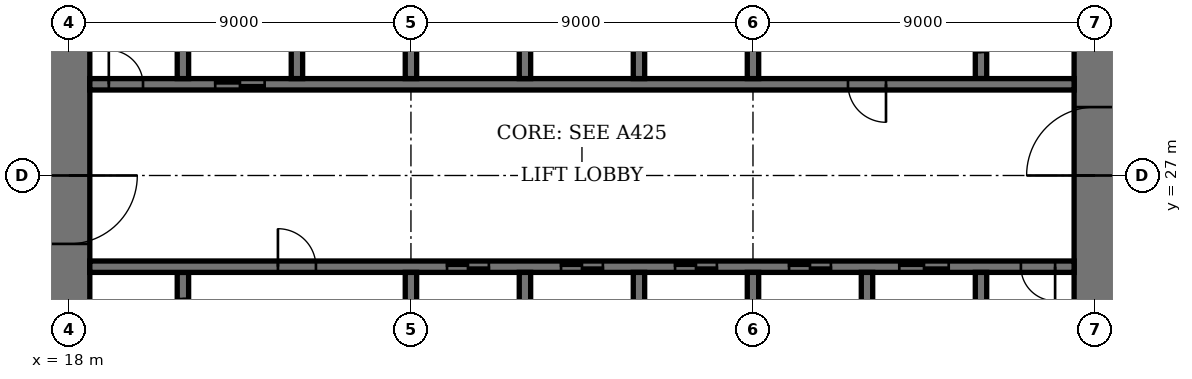
"""IFC4 building model, lengths in metres.
Left out: names, types, materials, properties, quantities, classifications, styles, units other than length and angle.
Written with IfcOpenShell. Run it as: python <this file> out.ifc"""

import sys

from ifc_helpers import new_model, si_unit, direction, frame, frame_2d, origin, place, context, subcontext, project, spatial, rectangle, extrude, element, fill, save


model = new_model("IFC4")
c1 = context("Model", 3, precision=1e-05, world=origin(), true_north=direction((0.0, 1.0)))
c2 = subcontext(c1, "Body", "Model", "MODEL_VIEW")
j1 = project(units=[si_unit("LENGTHUNIT", "METRE"), si_unit("PLANEANGLEUNIT", "RADIAN")], contexts=[c1])
p1 = place(None, origin())
s1 = spatial("IfcSite", under=j1, at=p1, CompositionType="ELEMENT")
p2 = place(p1, origin())
s2 = spatial("IfcBuilding", under=s1, at=p2, CompositionType="ELEMENT")
p3 = place(p2, frame((0.0, 0.0, 39.8)))
s3 = spatial("IfcBuildingStorey", under=s2, at=p3, CompositionType="ELEMENT", Elevation=39.8)
p4 = place(p3, frame((18.0, 35.45, 0.0), z_axis=(0.0, 0.0, 1.0), x_axis=(0.0, -1.0, 0.0)))
e1 = element("IfcWall", 1, at=p4, inside=s3, PredefinedType="SHEAR", context=c2, shape_type="SweptSolid", body=[
    extrude(rectangle(XDim=16.9, YDim=1.1, at=frame_2d((8.45, 0.0))), origin(), (0.0, 0.0, 1.0), 4.0),
])
p5 = place(p4, frame((8.45, 0.0, 0.0)))
e2 = element("IfcOpeningElement", 2, at=p5, cuts=e1, PredefinedType="OPENING", context=c2, shape_type="SweptSolid", body=[
    extrude(rectangle(XDim=1.8, YDim=2.4, at=frame_2d((0.9, 1.2))), frame((0.0, 0.56, 0.0), z_axis=(0.0, -1.0, 0.0), x_axis=(1.0, 0.0, 0.0)), (0.0, 0.0, 1.0), 1.12),
])
p6 = place(p3, frame((45.0, 18.55, 0.0), z_axis=(0.0, 0.0, 1.0), x_axis=(0.0, 1.0, 0.0)))
e3 = element("IfcWall", 3, at=p6, inside=s3, PredefinedType="SHEAR", context=c2, shape_type="SweptSolid", body=[
    extrude(rectangle(XDim=16.9, YDim=1.1, at=frame_2d((8.45, 0.0))), origin(), (0.0, 0.0, 1.0), 4.0),
])
p7 = place(p6, frame((8.45, 0.0, 0.0)))
e4 = element("IfcOpeningElement", 4, at=p7, cuts=e3, PredefinedType="OPENING", context=c2, shape_type="SweptSolid", body=[
    extrude(rectangle(XDim=1.8, YDim=2.4, at=frame_2d((0.9, 1.2))), frame((0.0, 0.56, 0.0), z_axis=(0.0, -1.0, 0.0), x_axis=(1.0, 0.0, 0.0)), (0.0, 0.0, 1.0), 1.12),
])
p8 = place(p3, frame((21.0, 21.95, 0.0), z_axis=(0.0, 0.0, 1.0), x_axis=(0.0, 1.0, 0.0)))
e5 = element("IfcWall", 5, at=p8, inside=s3, PredefinedType="SHEAR", context=c2, shape_type="SweptSolid", body=[
    extrude(rectangle(XDim=2.5, YDim=0.3, at=frame_2d((1.25, 0.0))), origin(), (0.0, 0.0, 1.0), 4.0),
])
p9 = place(p8, frame((0.7, 0.0, 0.0)))
e6 = element("IfcOpeningElement", 6, at=p9, cuts=e5, PredefinedType="OPENING", context=c2, shape_type="SweptSolid", body=[
    extrude(rectangle(XDim=1.1, YDim=2.4, at=frame_2d((0.55, 1.2))), frame((0.0, 0.16, 0.0), z_axis=(0.0, -1.0, 0.0), x_axis=(1.0, 0.0, 0.0)), (0.0, 0.0, 1.0), 0.32),
])
p10 = place(p3, frame((42.0, 29.55, 0.0), z_axis=(0.0, 0.0, 1.0), x_axis=(0.0, 1.0, 0.0)))
e7 = element("IfcWall", 7, at=p10, inside=s3, PredefinedType="SHEAR", context=c2, shape_type="SweptSolid", body=[
    extrude(rectangle(XDim=2.5, YDim=0.3, at=frame_2d((1.25, 0.0))), origin(), (0.0, 0.0, 1.0), 4.0),
])
p11 = place(p10, frame((0.7, 0.0, 0.0)))
e8 = element("IfcOpeningElement", 8, at=p11, cuts=e7, PredefinedType="OPENING", context=c2, shape_type="SweptSolid", body=[
    extrude(rectangle(XDim=1.1, YDim=2.4, at=frame_2d((0.55, 1.2))), frame((0.0, 0.16, 0.0), z_axis=(0.0, -1.0, 0.0), x_axis=(1.0, 0.0, 0.0)), (0.0, 0.0, 1.0), 0.32),
])
p12 = place(p3, frame((18.55, 24.6, 0.0), z_axis=(0.0, 0.0, 1.0), x_axis=(1.0, 0.0, 0.0)))
e9 = element("IfcWall", 9, at=p12, inside=s3, PredefinedType="SHEAR", context=c2, shape_type="SweptSolid", body=[
    extrude(rectangle(XDim=25.9, YDim=0.3, at=frame_2d((12.95, 0.0))), origin(), (0.0, 0.0, 1.0), 4.0),
])
p13 = place(p12, frame((4.95, 0.0, 0.0)))
e10 = element("IfcOpeningElement", 10, at=p13, cuts=e9, PredefinedType="OPENING", context=c2, shape_type="SweptSolid", body=[
    extrude(rectangle(XDim=1.0, YDim=2.4, at=frame_2d((0.5, 1.2))), frame((0.0, 0.16, 0.0), z_axis=(0.0, -1.0, 0.0), x_axis=(1.0, 0.0, 0.0)), (0.0, 0.0, 1.0), 0.32),
])
p14 = place(p12, frame((24.5, 0.0, 0.0)))
e11 = element("IfcOpeningElement", 11, at=p14, cuts=e9, PredefinedType="OPENING", context=c2, shape_type="SweptSolid", body=[
    extrude(rectangle(XDim=0.9, YDim=2.1, at=frame_2d((0.45, 1.05))), frame((0.0, 0.16, 0.0), z_axis=(0.0, -1.0, 0.0), x_axis=(1.0, 0.0, 0.0)), (0.0, 0.0, 1.0), 0.32),
])
p15 = place(p12, frame((9.4, 0.0, 0.0)))
e12 = element("IfcOpeningElement", 12, at=p15, cuts=e9, PredefinedType="OPENING", context=c2, shape_type="SweptSolid", body=[
    extrude(rectangle(XDim=1.1, YDim=2.4, at=frame_2d((0.55, 1.2))), frame((0.0, 0.16, 0.0), z_axis=(0.0, -1.0, 0.0), x_axis=(1.0, 0.0, 0.0)), (0.0, 0.0, 1.0), 0.32),
])
p16 = place(p12, frame((12.4, 0.0, 0.0)))
e13 = element("IfcOpeningElement", 13, at=p16, cuts=e9, PredefinedType="OPENING", context=c2, shape_type="SweptSolid", body=[
    extrude(rectangle(XDim=1.1, YDim=2.4, at=frame_2d((0.55, 1.2))), frame((0.0, 0.16, 0.0), z_axis=(0.0, -1.0, 0.0), x_axis=(1.0, 0.0, 0.0)), (0.0, 0.0, 1.0), 0.32),
])
p17 = place(p12, frame((15.4, 0.0, 0.0)))
e14 = element("IfcOpeningElement", 14, at=p17, cuts=e9, PredefinedType="OPENING", context=c2, shape_type="SweptSolid", body=[
    extrude(rectangle(XDim=1.1, YDim=2.4, at=frame_2d((0.55, 1.2))), frame((0.0, 0.16, 0.0), z_axis=(0.0, -1.0, 0.0), x_axis=(1.0, 0.0, 0.0)), (0.0, 0.0, 1.0), 0.32),
])
p18 = place(p12, frame((18.4, 0.0, 0.0)))
e15 = element("IfcOpeningElement", 15, at=p18, cuts=e9, PredefinedType="OPENING", context=c2, shape_type="SweptSolid", body=[
    extrude(rectangle(XDim=1.1, YDim=2.4, at=frame_2d((0.55, 1.2))), frame((0.0, 0.16, 0.0), z_axis=(0.0, -1.0, 0.0), x_axis=(1.0, 0.0, 0.0)), (0.0, 0.0, 1.0), 0.32),
])
p19 = place(p12, frame((21.3, 0.0, 0.0)))
e16 = element("IfcOpeningElement", 16, at=p19, cuts=e9, PredefinedType="OPENING", context=c2, shape_type="SweptSolid", body=[
    extrude(rectangle(XDim=1.3, YDim=2.4, at=frame_2d((0.65, 1.2))), frame((0.0, 0.16, 0.0), z_axis=(0.0, -1.0, 0.0), x_axis=(1.0, 0.0, 0.0)), (0.0, 0.0, 1.0), 0.32),
])
p20 = place(p3, frame((18.55, 29.4, 0.0), z_axis=(0.0, 0.0, 1.0), x_axis=(1.0, 0.0, 0.0)))
e17 = element("IfcWall", 17, at=p20, inside=s3, PredefinedType="SHEAR", context=c2, shape_type="SweptSolid", body=[
    extrude(rectangle(XDim=25.9, YDim=0.3, at=frame_2d((12.95, 0.0))), origin(), (0.0, 0.0, 1.0), 4.0),
])
p21 = place(p20, frame((19.95, 0.0, 0.0)))
e18 = element("IfcOpeningElement", 18, at=p21, cuts=e17, PredefinedType="OPENING", context=c2, shape_type="SweptSolid", body=[
    extrude(rectangle(XDim=1.0, YDim=2.4, at=frame_2d((0.5, 1.2))), frame((0.0, 0.16, 0.0), z_axis=(0.0, -1.0, 0.0), x_axis=(1.0, 0.0, 0.0)), (0.0, 0.0, 1.0), 0.32),
])
p22 = place(p20, frame((0.5, 0.0, 0.0)))
e19 = element("IfcOpeningElement", 19, at=p22, cuts=e17, PredefinedType="OPENING", context=c2, shape_type="SweptSolid", body=[
    extrude(rectangle(XDim=0.9, YDim=2.1, at=frame_2d((0.45, 1.05))), frame((0.0, 0.16, 0.0), z_axis=(0.0, -1.0, 0.0), x_axis=(1.0, 0.0, 0.0)), (0.0, 0.0, 1.0), 0.32),
])
p23 = place(p20, frame((3.3, 0.0, 0.0)))
e20 = element("IfcOpeningElement", 20, at=p23, cuts=e17, PredefinedType="OPENING", context=c2, shape_type="SweptSolid", body=[
    extrude(rectangle(XDim=1.3, YDim=2.4, at=frame_2d((0.65, 1.2))), frame((0.0, 0.16, 0.0), z_axis=(0.0, -1.0, 0.0), x_axis=(1.0, 0.0, 0.0)), (0.0, 0.0, 1.0), 0.32),
])
for number, where, z_axis, x_axis in (
    (21, (30.0, 21.75, 0.0), (0.0, 0.0, 1.0), (0.0, 1.0, 0.0)),
    (22, (33.0, 29.55, 0.0), (0.0, 0.0, 1.0), (0.0, 1.0, 0.0)),
    (23, (33.0, 21.75, 0.0), (0.0, 0.0, 1.0), (0.0, 1.0, 0.0)),
    (24, (30.0, 29.55, 0.0), (0.0, 0.0, 1.0), (0.0, 1.0, 0.0)),
    (25, (36.0, 21.75, 0.0), (0.0, 0.0, 1.0), (0.0, 1.0, 0.0)),
    (26, (27.0, 29.55, 0.0), (0.0, 0.0, 1.0), (0.0, 1.0, 0.0)),
):
    element("IfcWall", number, at=place(p3, frame(where, z_axis=z_axis, x_axis=x_axis)), inside=s3, PredefinedType="SHEAR", context=c2, shape_type="SweptSolid", body=[
        extrude(rectangle(XDim=2.7, YDim=0.3, at=frame_2d((1.35, 0.0))), origin(), (0.0, 0.0, 1.0), 4.0),
    ])
for number, where, z_axis, x_axis in (
    (27, (39.0, 18.55, 0.0), (0.0, 0.0, 1.0), (0.0, 1.0, 0.0)),
    (28, (24.0, 29.55, 0.0), (0.0, 0.0, 1.0), (0.0, 1.0, 0.0)),
):
    element("IfcWall", number, at=place(p3, frame(where, z_axis=z_axis, x_axis=x_axis)), inside=s3, PredefinedType="SHEAR", context=c2, shape_type="SweptSolid", body=[
        extrude(rectangle(XDim=5.9, YDim=0.3, at=frame_2d((2.95, 0.0))), origin(), (0.0, 0.0, 1.0), 4.0),
    ])
for number, where, z_axis, x_axis in (
    (29, (42.0, 21.75, 0.0), (0.0, 0.0, 1.0), (0.0, 1.0, 0.0)),
    (30, (21.0, 29.55, 0.0), (0.0, 0.0, 1.0), (0.0, 1.0, 0.0)),
):
    element("IfcWall", number, at=place(p3, frame(where, z_axis=z_axis, x_axis=x_axis)), inside=s3, PredefinedType="SHEAR", context=c2, shape_type="SweptSolid", body=[
        extrude(rectangle(XDim=2.7, YDim=0.3, at=frame_2d((1.35, 0.0))), origin(), (0.0, 0.0, 1.0), 4.0),
    ])
for number, where, z_axis, x_axis in (
    (31, (27.0, 21.6, 0.0), (0.0, 0.0, 1.0), (0.0, 1.0, 0.0)),
    (32, (36.0, 29.55, 0.0), (0.0, 0.0, 1.0), (0.0, 1.0, 0.0)),
):
    element("IfcWall", number, at=place(p3, frame(where, z_axis=z_axis, x_axis=x_axis)), inside=s3, PredefinedType="SHEAR", context=c2, shape_type="SweptSolid", body=[
        extrude(rectangle(XDim=2.85, YDim=0.3, at=frame_2d((1.425, 0.0))), origin(), (0.0, 0.0, 1.0), 4.0),
    ])
p24 = place(p5, origin())
e33 = element("IfcDoor", 33, at=p24, inside=s3, OperationType="DOUBLE_DOOR_DOUBLE_SWING", PredefinedType="DOOR", context=c2, shape_type="SweptSolid", body=[
    extrude(rectangle(XDim=1.8, YDim=2.4, at=frame_2d((0.9, 1.2))), frame((0.0, 0.03, 0.0), z_axis=(0.0, -1.0, 0.0), x_axis=(1.0, 0.0, 0.0)), (0.0, 0.0, 1.0), 0.06),
    extrude(rectangle(XDim=0.04, YDim=2.4, at=frame_2d((0.02, 1.2))), frame((0.0, 0.55, 0.0), z_axis=(0.0, -1.0, 0.0), x_axis=(1.0, 0.0, 0.0)), (0.0, 0.0, 1.0), 1.1),
    extrude(rectangle(XDim=0.04, YDim=2.4, at=frame_2d((1.78, 1.2))), frame((0.0, 0.55, 0.0), z_axis=(0.0, -1.0, 0.0), x_axis=(1.0, 0.0, 0.0)), (0.0, 0.0, 1.0), 1.1),
    extrude(rectangle(XDim=1.8, YDim=0.04, at=frame_2d((0.9, 2.38))), frame((0.0, 0.55, 0.0), z_axis=(0.0, -1.0, 0.0), x_axis=(1.0, 0.0, 0.0)), (0.0, 0.0, 1.0), 1.1),
])
fill(e2, e33)
p25 = place(p7, origin())
e34 = element("IfcDoor", 34, at=p25, inside=s3, OperationType="DOUBLE_DOOR_DOUBLE_SWING", PredefinedType="DOOR", context=c2, shape_type="SweptSolid", body=[
    extrude(rectangle(XDim=1.8, YDim=2.4, at=frame_2d((0.9, 1.2))), frame((0.0, 0.03, 0.0), z_axis=(0.0, -1.0, 0.0), x_axis=(1.0, 0.0, 0.0)), (0.0, 0.0, 1.0), 0.06),
    extrude(rectangle(XDim=0.04, YDim=2.4, at=frame_2d((0.02, 1.2))), frame((0.0, 0.55, 0.0), z_axis=(0.0, -1.0, 0.0), x_axis=(1.0, 0.0, 0.0)), (0.0, 0.0, 1.0), 1.1),
    extrude(rectangle(XDim=0.04, YDim=2.4, at=frame_2d((1.78, 1.2))), frame((0.0, 0.55, 0.0), z_axis=(0.0, -1.0, 0.0), x_axis=(1.0, 0.0, 0.0)), (0.0, 0.0, 1.0), 1.1),
    extrude(rectangle(XDim=1.8, YDim=0.04, at=frame_2d((0.9, 2.38))), frame((0.0, 0.55, 0.0), z_axis=(0.0, -1.0, 0.0), x_axis=(1.0, 0.0, 0.0)), (0.0, 0.0, 1.0), 1.1),
])
fill(e4, e34)
p26 = place(p13, origin())
e35 = element("IfcDoor", 35, at=p26, inside=s3, OperationType="SINGLE_SWING_RIGHT", PredefinedType="DOOR", context=c2, shape_type="SweptSolid", body=[
    extrude(rectangle(XDim=1.0, YDim=2.4, at=frame_2d((0.5, 1.2))), frame((0.0, 0.03, 0.0), z_axis=(0.0, -1.0, 0.0), x_axis=(1.0, 0.0, 0.0)), (0.0, 0.0, 1.0), 0.06),
])
fill(e10, e35)
p27 = place(p21, origin())
e36 = element("IfcDoor", 36, at=p27, inside=s3, OperationType="SINGLE_SWING_RIGHT", PredefinedType="DOOR", context=c2, shape_type="SweptSolid", body=[
    extrude(rectangle(XDim=1.0, YDim=2.4, at=frame_2d((0.5, 1.2))), frame((0.0, 0.03, 0.0), z_axis=(0.0, -1.0, 0.0), x_axis=(1.0, 0.0, 0.0)), (0.0, 0.0, 1.0), 0.06),
])
fill(e18, e36)
p28 = place(p14, origin())
e37 = element("IfcDoor", 37, at=p28, inside=s3, OperationType="SINGLE_SWING_RIGHT", PredefinedType="DOOR", context=c2, shape_type="SweptSolid", body=[
    extrude(rectangle(XDim=0.9, YDim=2.1, at=frame_2d((0.45, 1.05))), frame((0.0, 0.03, 0.0), z_axis=(0.0, -1.0, 0.0), x_axis=(1.0, 0.0, 0.0)), (0.0, 0.0, 1.0), 0.06),
])
fill(e11, e37)
p29 = place(p22, origin())
e38 = element("IfcDoor", 38, at=p29, inside=s3, OperationType="SINGLE_SWING_RIGHT", PredefinedType="DOOR", context=c2, shape_type="SweptSolid", body=[
    extrude(rectangle(XDim=0.9, YDim=2.1, at=frame_2d((0.45, 1.05))), frame((0.0, 0.03, 0.0), z_axis=(0.0, -1.0, 0.0), x_axis=(1.0, 0.0, 0.0)), (0.0, 0.0, 1.0), 0.06),
])
fill(e19, e38)
p30 = place(p15, origin())
e39 = element("IfcDoor", 39, at=p30, inside=s3, OperationType="DOUBLE_DOOR_SLIDING", PredefinedType="DOOR", context=c2, shape_type="SweptSolid", body=[
    extrude(rectangle(XDim=1.1, YDim=2.4, at=frame_2d((0.55, 1.2))), frame((0.0, 0.02, 0.0), z_axis=(0.0, -1.0, 0.0), x_axis=(1.0, 0.0, 0.0)), (0.0, 0.0, 1.0), 0.04),
])
fill(e12, e39)
p31 = place(p16, origin())
e40 = element("IfcDoor", 40, at=p31, inside=s3, OperationType="DOUBLE_DOOR_SLIDING", PredefinedType="DOOR", context=c2, shape_type="SweptSolid", body=[
    extrude(rectangle(XDim=1.1, YDim=2.4, at=frame_2d((0.55, 1.2))), frame((0.0, 0.02, 0.0), z_axis=(0.0, -1.0, 0.0), x_axis=(1.0, 0.0, 0.0)), (0.0, 0.0, 1.0), 0.04),
])
fill(e13, e40)
p32 = place(p17, origin())
e41 = element("IfcDoor", 41, at=p32, inside=s3, OperationType="DOUBLE_DOOR_SLIDING", PredefinedType="DOOR", context=c2, shape_type="SweptSolid", body=[
    extrude(rectangle(XDim=1.1, YDim=2.4, at=frame_2d((0.55, 1.2))), frame((0.0, 0.02, 0.0), z_axis=(0.0, -1.0, 0.0), x_axis=(1.0, 0.0, 0.0)), (0.0, 0.0, 1.0), 0.04),
])
fill(e14, e41)
p33 = place(p18, origin())
e42 = element("IfcDoor", 42, at=p33, inside=s3, OperationType="DOUBLE_DOOR_SLIDING", PredefinedType="DOOR", context=c2, shape_type="SweptSolid", body=[
    extrude(rectangle(XDim=1.1, YDim=2.4, at=frame_2d((0.55, 1.2))), frame((0.0, 0.02, 0.0), z_axis=(0.0, -1.0, 0.0), x_axis=(1.0, 0.0, 0.0)), (0.0, 0.0, 1.0), 0.04),
])
fill(e15, e42)
p34 = place(p19, origin())
e43 = element("IfcDoor", 43, at=p34, inside=s3, OperationType="DOUBLE_DOOR_SLIDING", PredefinedType="DOOR", context=c2, shape_type="SweptSolid", body=[
    extrude(rectangle(XDim=1.3, YDim=2.4, at=frame_2d((0.65, 1.2))), frame((0.0, 0.02, 0.0), z_axis=(0.0, -1.0, 0.0), x_axis=(1.0, 0.0, 0.0)), (0.0, 0.0, 1.0), 0.04),
])
fill(e16, e43)
p35 = place(p23, origin())
e44 = element("IfcDoor", 44, at=p35, inside=s3, OperationType="DOUBLE_DOOR_SLIDING", PredefinedType="DOOR", context=c2, shape_type="SweptSolid", body=[
    extrude(rectangle(XDim=1.3, YDim=2.4, at=frame_2d((0.65, 1.2))), frame((0.0, 0.02, 0.0), z_axis=(0.0, -1.0, 0.0), x_axis=(1.0, 0.0, 0.0)), (0.0, 0.0, 1.0), 0.04),
])
fill(e20, e44)
save(model, sys.argv[1])
